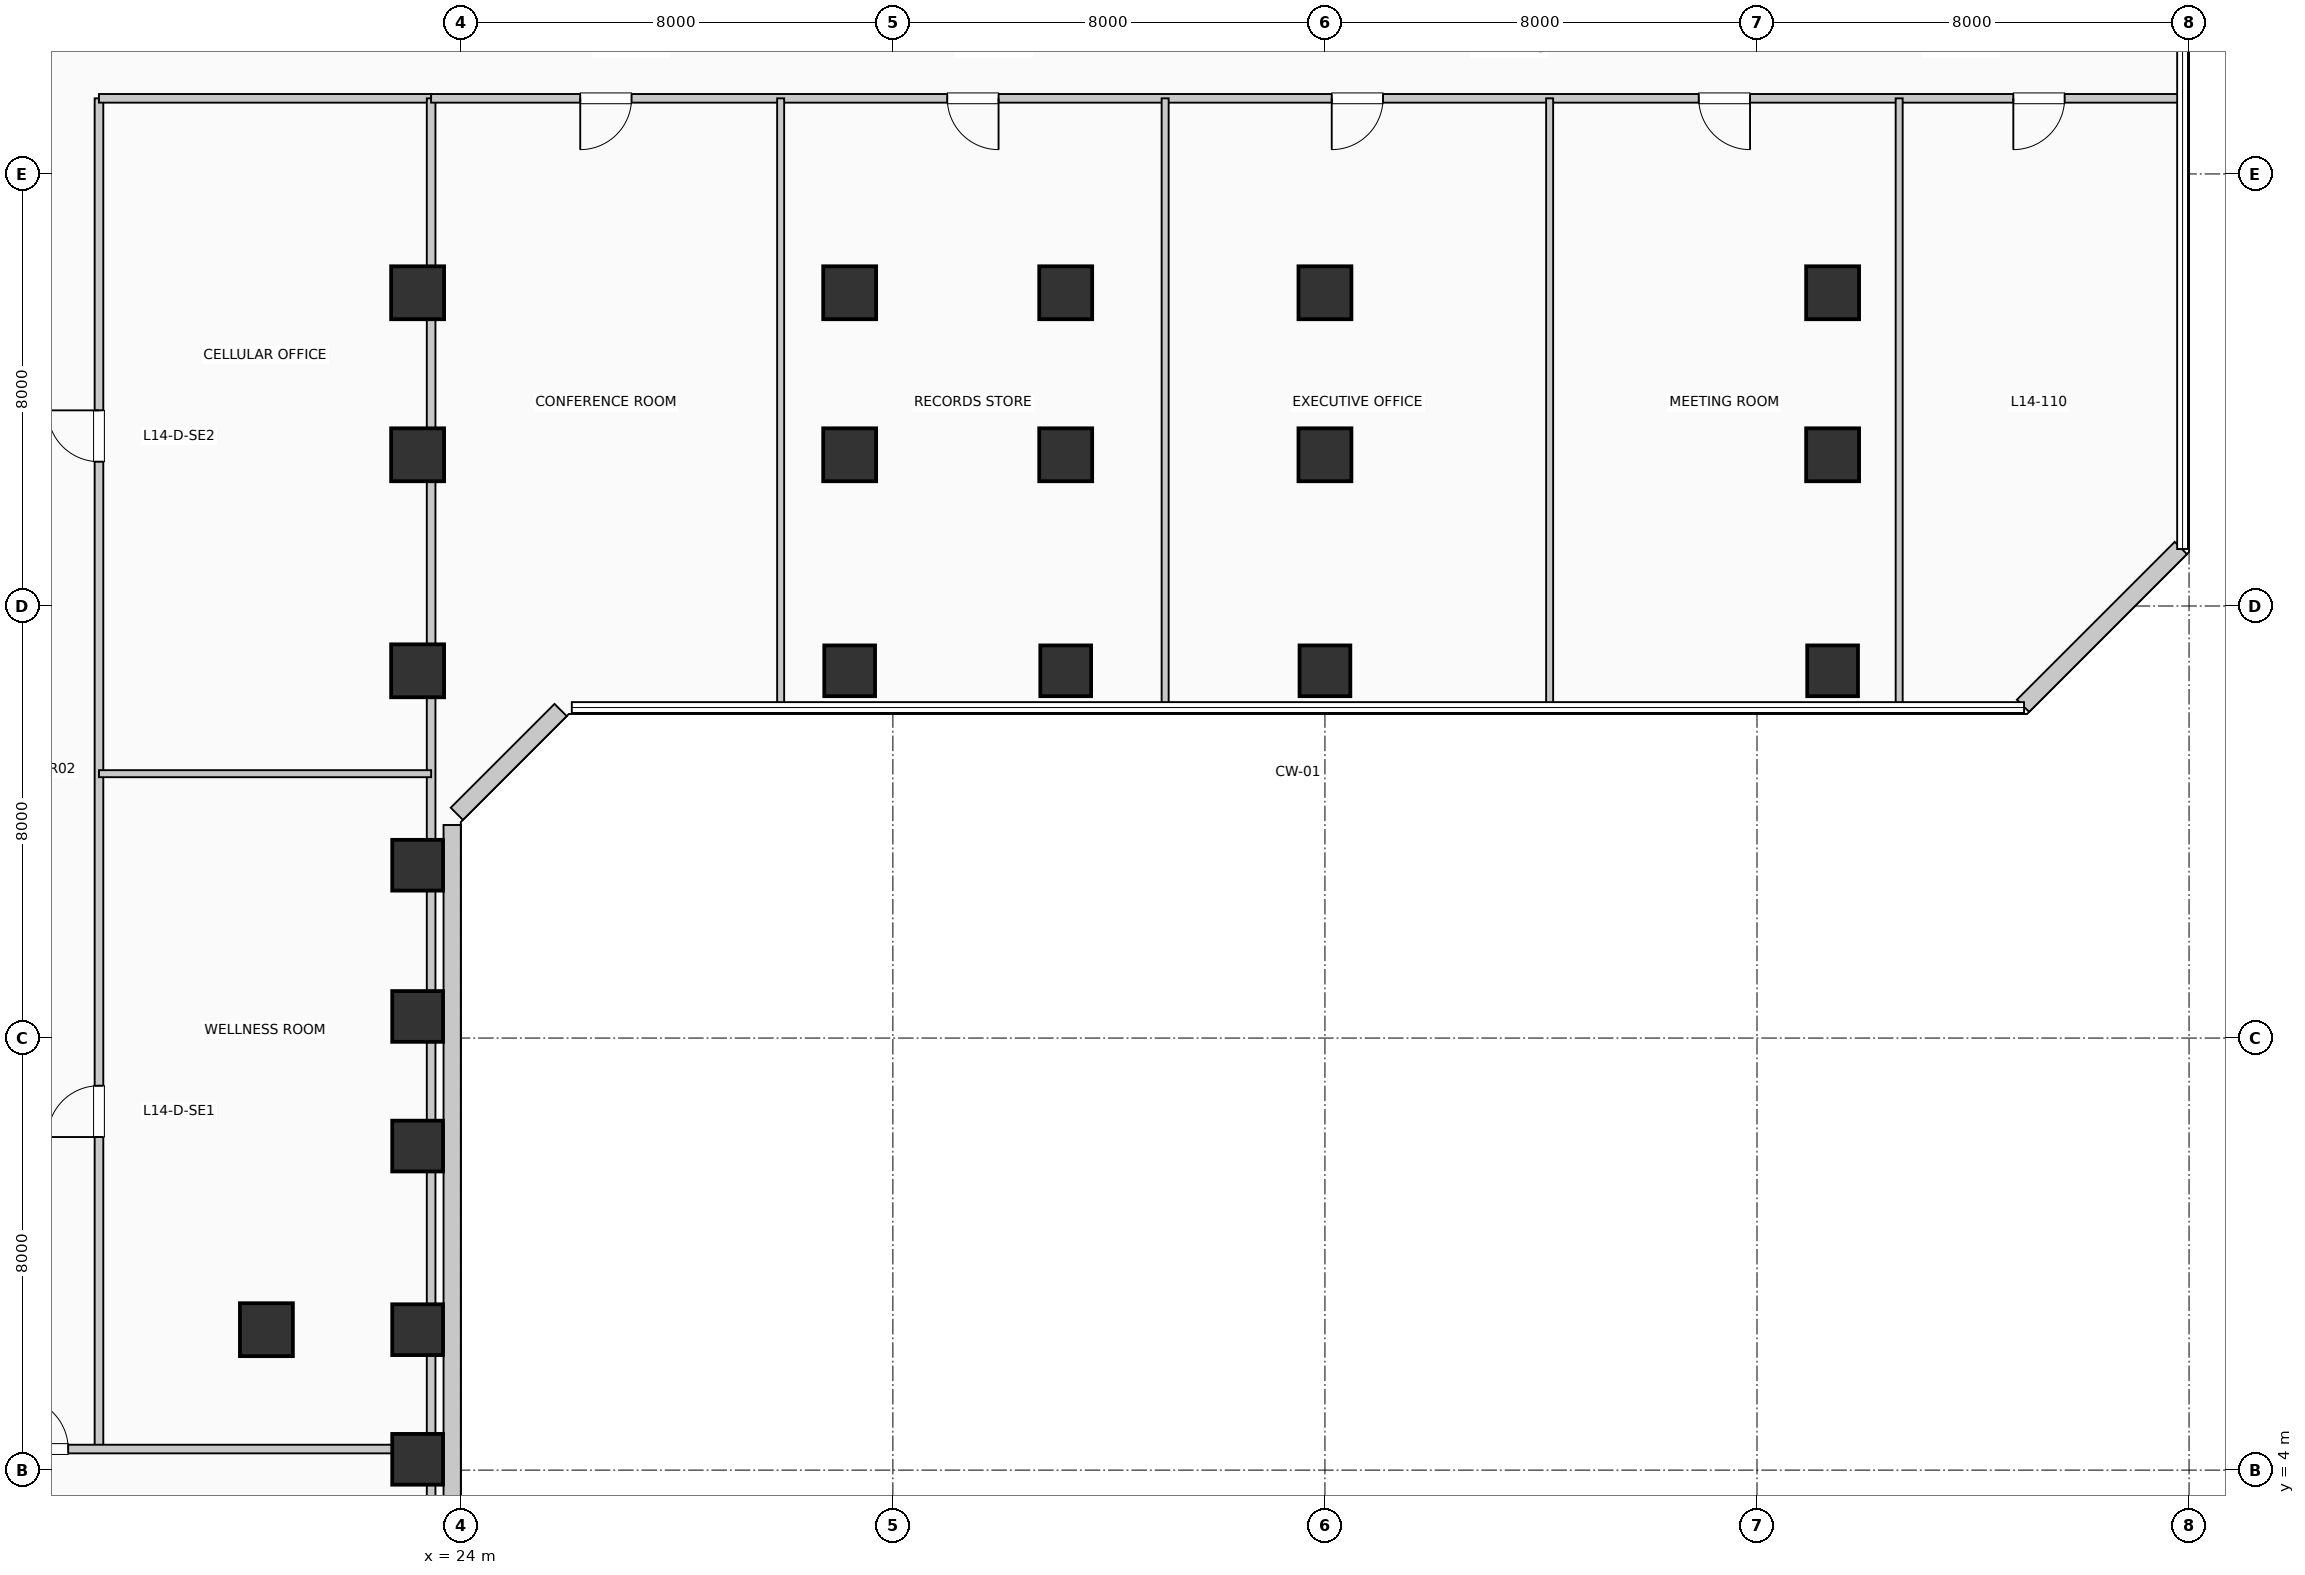
"""IFC4 building model, lengths in metres.
Left out: names, types, materials, properties, quantities, classifications, styles, units other than length and angle.
Written with IfcOpenShell. Run it as: python <this file> out.ifc"""

import sys

from ifc_helpers import new_model, si_unit, direction, frame, frame_2d, origin, origin_2d, place, context, subcontext, project, spatial, rectangle, extrude, element, fill, save


model = new_model("IFC4")
c1 = context("Model", 3, precision=1e-05, world=origin(), true_north=direction((0.0, 1.0)))
c2 = subcontext(c1, "Body", "Model", "MODEL_VIEW")
j1 = project(units=[si_unit("LENGTHUNIT", "METRE"), si_unit("PLANEANGLEUNIT", "RADIAN")], contexts=[c1])
p1 = place(None, origin())
s1 = spatial("IfcSite", under=j1, at=p1, CompositionType="ELEMENT")
p2 = place(p1, origin())
s2 = spatial("IfcBuilding", under=s1, at=p2, CompositionType="ELEMENT")
p3 = place(p2, frame((0.0, 0.0, 62.04)))
s3 = spatial("IfcBuildingStorey", under=s2, at=p3, CompositionType="ELEMENT", Elevation=62.04)
p4 = place(p3, frame((20.4, 6.6, 0.0), z_axis=(0.0, 0.0, 1.0), x_axis=(1.0, 0.0, 0.0)))
e1 = element("IfcColumn", 1, at=p4, inside=s3, PredefinedType="COLUMN", context=c2, shape_type="SweptSolid", body=[
    extrude(rectangle(XDim=0.98, YDim=0.98, at=origin_2d()), origin(), (0.0, 0.0, 1.0), 3.96),
])
for number, where, z_axis, x_axis in (
    (2, (23.2, 4.2, 0.0), (0.0, 0.0, 1.0), (1.0, 0.0, 0.0)),
    (3, (23.2, 6.6, 0.0), (0.0, 0.0, 1.0), (1.0, 0.0, 0.0)),
    (4, (23.2, 10.0, 0.0), (0.0, 0.0, 1.0), (1.0, 0.0, 0.0)),
    (5, (23.2, 12.4, 0.0), (0.0, 0.0, 1.0), (1.0, 0.0, 0.0)),
    (6, (23.2, 15.2, 0.0), (0.0, 0.0, 1.0), (1.0, 0.0, 0.0)),
):
    element("IfcColumn", number, at=place(p3, frame(where, z_axis=z_axis, x_axis=x_axis)), inside=s3, PredefinedType="COLUMN", context=c2, shape_type="SweptSolid", body=[
        extrude(rectangle(XDim=0.94, YDim=0.94, at=origin_2d()), origin(), (0.0, 0.0, 1.0), 3.96),
    ])
for number, where, z_axis, x_axis in (
    (7, (23.2, 18.8, 0.0), (0.0, 0.0, 1.0), (1.0, 0.0, 0.0)),
    (8, (23.2, 22.8, 0.0), (0.0, 0.0, 1.0), (1.0, 0.0, 0.0)),
    (9, (23.2, 25.8, 0.0), (0.0, 0.0, 1.0), (1.0, 0.0, 0.0)),
):
    element("IfcColumn", number, at=place(p3, frame(where, z_axis=z_axis, x_axis=x_axis)), inside=s3, PredefinedType="COLUMN", context=c2, shape_type="SweptSolid", body=[
        extrude(rectangle(XDim=0.98, YDim=0.98, at=origin_2d()), origin(), (0.0, 0.0, 1.0), 3.96),
    ])
p5 = place(p3, frame((31.2, 18.8, 0.0), z_axis=(0.0, 0.0, 1.0), x_axis=(1.0, 0.0, 0.0)))
e10 = element("IfcColumn", 10, at=p5, inside=s3, PredefinedType="COLUMN", context=c2, shape_type="SweptSolid", body=[
    extrude(rectangle(XDim=0.94, YDim=0.94, at=origin_2d()), origin(), (0.0, 0.0, 1.0), 3.96),
])
for number, where, z_axis, x_axis in (
    (11, (31.2, 22.8, 0.0), (0.0, 0.0, 1.0), (1.0, 0.0, 0.0)),
    (12, (31.2, 25.8, 0.0), (0.0, 0.0, 1.0), (1.0, 0.0, 0.0)),
):
    element("IfcColumn", number, at=place(p3, frame(where, z_axis=z_axis, x_axis=x_axis)), inside=s3, PredefinedType="COLUMN", context=c2, shape_type="SweptSolid", body=[
        extrude(rectangle(XDim=0.98, YDim=0.98, at=origin_2d()), origin(), (0.0, 0.0, 1.0), 3.96),
    ])
p6 = place(p3, frame((35.2, 18.8, 0.0), z_axis=(0.0, 0.0, 1.0), x_axis=(1.0, 0.0, 0.0)))
e13 = element("IfcColumn", 13, at=p6, inside=s3, PredefinedType="COLUMN", context=c2, shape_type="SweptSolid", body=[
    extrude(rectangle(XDim=0.94, YDim=0.94, at=origin_2d()), origin(), (0.0, 0.0, 1.0), 3.96),
])
for number, where, z_axis, x_axis in (
    (14, (35.2, 22.8, 0.0), (0.0, 0.0, 1.0), (1.0, 0.0, 0.0)),
    (15, (35.2, 25.8, 0.0), (0.0, 0.0, 1.0), (1.0, 0.0, 0.0)),
):
    element("IfcColumn", number, at=place(p3, frame(where, z_axis=z_axis, x_axis=x_axis)), inside=s3, PredefinedType="COLUMN", context=c2, shape_type="SweptSolid", body=[
        extrude(rectangle(XDim=0.98, YDim=0.98, at=origin_2d()), origin(), (0.0, 0.0, 1.0), 3.96),
    ])
p7 = place(p3, frame((40.0, 18.8, 0.0), z_axis=(0.0, 0.0, 1.0), x_axis=(1.0, 0.0, 0.0)))
e16 = element("IfcColumn", 16, at=p7, inside=s3, PredefinedType="COLUMN", context=c2, shape_type="SweptSolid", body=[
    extrude(rectangle(XDim=0.94, YDim=0.94, at=origin_2d()), origin(), (0.0, 0.0, 1.0), 3.96),
])
for number, where, z_axis, x_axis in (
    (17, (40.0, 22.8, 0.0), (0.0, 0.0, 1.0), (1.0, 0.0, 0.0)),
    (18, (40.0, 25.8, 0.0), (0.0, 0.0, 1.0), (1.0, 0.0, 0.0)),
):
    element("IfcColumn", number, at=place(p3, frame(where, z_axis=z_axis, x_axis=x_axis)), inside=s3, PredefinedType="COLUMN", context=c2, shape_type="SweptSolid", body=[
        extrude(rectangle(XDim=0.98, YDim=0.98, at=origin_2d()), origin(), (0.0, 0.0, 1.0), 3.96),
    ])
p8 = place(p3, frame((49.4, 18.8, 0.0), z_axis=(0.0, 0.0, 1.0), x_axis=(1.0, 0.0, 0.0)))
e19 = element("IfcColumn", 19, at=p8, inside=s3, PredefinedType="COLUMN", context=c2, shape_type="SweptSolid", body=[
    extrude(rectangle(XDim=0.94, YDim=0.94, at=origin_2d()), origin(), (0.0, 0.0, 1.0), 3.96),
])
for number, where, z_axis, x_axis in (
    (20, (49.4, 22.8, 0.0), (0.0, 0.0, 1.0), (1.0, 0.0, 0.0)),
    (21, (49.4, 25.8, 0.0), (0.0, 0.0, 1.0), (1.0, 0.0, 0.0)),
):
    element("IfcColumn", number, at=place(p3, frame(where, z_axis=z_axis, x_axis=x_axis)), inside=s3, PredefinedType="COLUMN", context=c2, shape_type="SweptSolid", body=[
        extrude(rectangle(XDim=0.98, YDim=0.98, at=origin_2d()), origin(), (0.0, 0.0, 1.0), 3.96),
    ])
p9 = place(p3, frame((23.84, 3.055, 0.0), z_axis=(0.0, 0.0, 1.0), x_axis=(0.0, 1.0, 0.0)))
e22 = element("IfcWall", 22, at=p9, inside=s3, PredefinedType="SOLIDWALL", context=c2, shape_type="SweptSolid", body=[
    extrude(rectangle(XDim=12.89, YDim=0.32, at=frame_2d((6.445, 0.0))), origin(), (0.0, 0.0, 1.0), 3.71),
])
p10 = place(p3, frame((23.926, 16.152, 0.0), z_axis=(0.0, 0.0, 1.0), x_axis=(0.707106781187, 0.707106781187, 0.0)))
e23 = element("IfcWall", 23, at=p10, inside=s3, PredefinedType="SOLIDWALL", context=c2, shape_type="SweptSolid", body=[
    extrude(rectangle(XDim=2.718, YDim=0.32, at=frame_2d((1.359, 0.0))), origin(), (0.0, 0.0, 1.0), 3.71),
])
p11 = place(p3, frame((52.926, 18.152, 0.0), z_axis=(0.0, 0.0, 1.0), x_axis=(0.707106781187, 0.707106781187, 0.0)))
e24 = element("IfcWall", 24, at=p11, inside=s3, PredefinedType="SOLIDWALL", context=c2, shape_type="SweptSolid", body=[
    extrude(rectangle(XDim=4.133, YDim=0.32, at=frame_2d((2.066, 0.0))), origin(), (0.0, 0.0, 1.0), 3.71),
])
p12 = place(p3, frame((17.3, 4.39, 0.0), z_axis=(0.0, 0.0, 1.0), x_axis=(0.0, 1.0, 0.0)))
e25 = element("IfcWall", 25, at=p12, inside=s3, PredefinedType="PARTITIONING", context=c2, shape_type="SweptSolid", body=[
    extrude(rectangle(XDim=25.01, YDim=0.16, at=frame_2d((12.505, 0.0))), origin(), (0.0, 0.0, 1.0), 3.71),
])
p13 = place(p12, frame((5.778, 0.0, 0.0)))
e26 = element("IfcOpeningElement", 26, at=p13, cuts=e25, PredefinedType="OPENING", context=c2, shape_type="SweptSolid", body=[
    extrude(rectangle(XDim=0.95, YDim=2.15, at=frame_2d((0.475, 1.075))), frame((0.0, 0.09, 0.0), z_axis=(0.0, -1.0, 0.0), x_axis=(1.0, 0.0, 0.0)), (0.0, 0.0, 1.0), 0.18),
])
p14 = place(p12, frame((18.282, 0.0, 0.0)))
e27 = element("IfcOpeningElement", 27, at=p14, cuts=e25, PredefinedType="OPENING", context=c2, shape_type="SweptSolid", body=[
    extrude(rectangle(XDim=0.95, YDim=2.15, at=frame_2d((0.475, 1.075))), frame((0.0, 0.09, 0.0), z_axis=(0.0, -1.0, 0.0), x_axis=(1.0, 0.0, 0.0)), (0.0, 0.0, 1.0), 0.18),
])
p15 = place(p3, frame((0.19, 4.39, 0.0), z_axis=(0.0, 0.0, 1.0), x_axis=(1.0, 0.0, 0.0)))
e28 = element("IfcWall", 28, at=p15, inside=s3, PredefinedType="PARTITIONING", context=c2, shape_type="SweptSolid", body=[
    extrude(rectangle(XDim=23.26, YDim=0.16, at=frame_2d((11.63, 0.0))), origin(), (0.0, 0.0, 1.0), 2.995),
])
p16 = place(p15, frame((15.59, 0.0, 0.0)))
e29 = element("IfcOpeningElement", 29, at=p16, cuts=e28, PredefinedType="OPENING", context=c2, shape_type="SweptSolid", body=[
    extrude(rectangle(XDim=0.95, YDim=2.15, at=frame_2d((0.475, 1.075))), frame((0.0, 0.09, 0.0), z_axis=(0.0, -1.0, 0.0), x_axis=(1.0, 0.0, 0.0)), (0.0, 0.0, 1.0), 0.18),
])
p17 = place(p3, frame((17.3, 29.4, 0.0), z_axis=(0.0, 0.0, 1.0), x_axis=(1.0, 0.0, 0.0)))
e30 = element("IfcWall", 30, at=p17, inside=s3, PredefinedType="PARTITIONING", context=c2, shape_type="SweptSolid", body=[
    extrude(rectangle(XDim=6.15, YDim=0.16, at=frame_2d((3.075, 0.0))), origin(), (0.0, 0.0, 1.0), 3.71),
])
p18 = place(p3, frame((23.45, 0.19, 0.0), z_axis=(0.0, 0.0, 1.0), x_axis=(0.0, 1.0, 0.0)))
e31 = element("IfcWall", 31, at=p18, inside=s3, PredefinedType="PARTITIONING", context=c2, shape_type="SweptSolid", body=[
    extrude(rectangle(XDim=29.21, YDim=0.16, at=frame_2d((14.605, 0.0))), origin(), (0.0, 0.0, 1.0), 2.995),
])
p19 = place(p3, frame((17.3, 16.895, 0.0), z_axis=(0.0, 0.0, 1.0), x_axis=(1.0, 0.0, 0.0)))
e32 = element("IfcWall", 32, at=p19, inside=s3, PredefinedType="PARTITIONING", context=c2, shape_type="SweptSolid", body=[
    extrude(rectangle(XDim=6.15, YDim=0.13, at=frame_2d((3.075, 0.0))), origin(), (0.0, 0.0, 1.0), 3.71),
])
p20 = place(p3, frame((23.45, 29.4, 0.0), z_axis=(0.0, 0.0, 1.0), x_axis=(1.0, 0.0, 0.0)))
e33 = element("IfcWall", 33, at=p20, inside=s3, PredefinedType="PARTITIONING", context=c2, shape_type="SweptSolid", body=[
    extrude(rectangle(XDim=32.36, YDim=0.16, at=frame_2d((16.18, 0.0))), origin(), (0.0, 0.0, 1.0), 3.365),
])
p21 = place(p20, frame((3.711, 0.0, 0.0), z_axis=(0.0, 0.0, 1.0), x_axis=(-1.0, 0.0, 0.0)))
e34 = element("IfcOpeningElement", 34, at=p21, cuts=e33, PredefinedType="OPENING", context=c2, shape_type="SweptSolid", body=[
    extrude(rectangle(XDim=0.95, YDim=2.15, at=frame_2d((0.475, 1.075))), frame((0.0, 0.09, 0.0), z_axis=(0.0, -1.0, 0.0), x_axis=(1.0, 0.0, 0.0)), (0.0, 0.0, 1.0), 0.18),
])
p22 = place(p20, frame((10.507, 0.0, 0.0), z_axis=(0.0, 0.0, 1.0), x_axis=(-1.0, 0.0, 0.0)))
e35 = element("IfcOpeningElement", 35, at=p22, cuts=e33, PredefinedType="OPENING", context=c2, shape_type="SweptSolid", body=[
    extrude(rectangle(XDim=0.95, YDim=2.15, at=frame_2d((0.475, 1.075))), frame((0.0, 0.09, 0.0), z_axis=(0.0, -1.0, 0.0), x_axis=(1.0, 0.0, 0.0)), (0.0, 0.0, 1.0), 0.18),
])
p23 = place(p20, frame((17.626, 0.0, 0.0), z_axis=(0.0, 0.0, 1.0), x_axis=(-1.0, 0.0, 0.0)))
e36 = element("IfcOpeningElement", 36, at=p23, cuts=e33, PredefinedType="OPENING", context=c2, shape_type="SweptSolid", body=[
    extrude(rectangle(XDim=0.95, YDim=2.15, at=frame_2d((0.475, 1.075))), frame((0.0, 0.09, 0.0), z_axis=(0.0, -1.0, 0.0), x_axis=(1.0, 0.0, 0.0)), (0.0, 0.0, 1.0), 0.18),
])
p24 = place(p20, frame((24.421, 0.0, 0.0), z_axis=(0.0, 0.0, 1.0), x_axis=(-1.0, 0.0, 0.0)))
e37 = element("IfcOpeningElement", 37, at=p24, cuts=e33, PredefinedType="OPENING", context=c2, shape_type="SweptSolid", body=[
    extrude(rectangle(XDim=0.95, YDim=2.15, at=frame_2d((0.475, 1.075))), frame((0.0, 0.09, 0.0), z_axis=(0.0, -1.0, 0.0), x_axis=(1.0, 0.0, 0.0)), (0.0, 0.0, 1.0), 0.18),
])
p25 = place(p20, frame((30.246, 0.0, 0.0), z_axis=(0.0, 0.0, 1.0), x_axis=(-1.0, 0.0, 0.0)))
e38 = element("IfcOpeningElement", 38, at=p25, cuts=e33, PredefinedType="OPENING", context=c2, shape_type="SweptSolid", body=[
    extrude(rectangle(XDim=0.95, YDim=2.15, at=frame_2d((0.475, 1.075))), frame((0.0, 0.09, 0.0), z_axis=(0.0, -1.0, 0.0), x_axis=(1.0, 0.0, 0.0)), (0.0, 0.0, 1.0), 0.18),
])
for number, where, z_axis, x_axis in (
    (39, (29.922, 18.19, 0.0), (0.0, 0.0, 1.0), (0.0, 1.0, 0.0)),
    (40, (37.041, 18.19, 0.0), (0.0, 0.0, 1.0), (0.0, 1.0, 0.0)),
    (41, (44.16, 18.19, 0.0), (0.0, 0.0, 1.0), (0.0, 1.0, 0.0)),
    (42, (50.632, 18.19, 0.0), (0.0, 0.0, 1.0), (0.0, 1.0, 0.0)),
):
    element("IfcWall", number, at=place(p3, frame(where, z_axis=z_axis, x_axis=x_axis)), inside=s3, PredefinedType="PARTITIONING", context=c2, shape_type="SweptSolid", body=[
        extrude(rectangle(XDim=11.21, YDim=0.13, at=frame_2d((5.605, 0.0))), origin(), (0.0, 0.0, 1.0), 3.71),
    ])
p26 = place(p16, origin())
e43 = element("IfcDoor", 43, at=p26, inside=s3, OperationType="SINGLE_SWING_LEFT", PredefinedType="DOOR", context=c2, shape_type="SweptSolid", body=[
    extrude(rectangle(XDim=0.95, YDim=2.15, at=frame_2d((0.475, 1.075))), frame((0.0, 0.025, 0.0), z_axis=(0.0, -1.0, 0.0), x_axis=(1.0, 0.0, 0.0)), (0.0, 0.0, 1.0), 0.05),
])
fill(e29, e43)
p27 = place(p13, origin())
e44 = element("IfcDoor", 44, at=p27, inside=s3, OperationType="SINGLE_SWING_LEFT", PredefinedType="DOOR", context=c2, shape_type="SweptSolid", body=[
    extrude(rectangle(XDim=0.95, YDim=2.15, at=frame_2d((0.475, 1.075))), frame((0.0, 0.025, 0.0), z_axis=(0.0, -1.0, 0.0), x_axis=(1.0, 0.0, 0.0)), (0.0, 0.0, 1.0), 0.05),
])
fill(e26, e44)
p28 = place(p14, origin())
e45 = element("IfcDoor", 45, at=p28, inside=s3, OperationType="SINGLE_SWING_RIGHT", PredefinedType="DOOR", context=c2, shape_type="SweptSolid", body=[
    extrude(rectangle(XDim=0.95, YDim=2.15, at=frame_2d((0.475, 1.075))), frame((0.0, 0.025, 0.0), z_axis=(0.0, -1.0, 0.0), x_axis=(1.0, 0.0, 0.0)), (0.0, 0.0, 1.0), 0.05),
])
fill(e27, e45)
p29 = place(p21, origin())
e46 = element("IfcDoor", 46, at=p29, inside=s3, OperationType="SINGLE_SWING_LEFT", PredefinedType="DOOR", context=c2, shape_type="SweptSolid", body=[
    extrude(rectangle(XDim=0.95, YDim=2.15, at=frame_2d((0.475, 1.075))), frame((0.0, 0.025, 0.0), z_axis=(0.0, -1.0, 0.0), x_axis=(1.0, 0.0, 0.0)), (0.0, 0.0, 1.0), 0.05),
])
fill(e34, e46)
p30 = place(p22, origin())
e47 = element("IfcDoor", 47, at=p30, inside=s3, OperationType="SINGLE_SWING_RIGHT", PredefinedType="DOOR", context=c2, shape_type="SweptSolid", body=[
    extrude(rectangle(XDim=0.95, YDim=2.15, at=frame_2d((0.475, 1.075))), frame((0.0, 0.025, 0.0), z_axis=(0.0, -1.0, 0.0), x_axis=(1.0, 0.0, 0.0)), (0.0, 0.0, 1.0), 0.05),
])
fill(e35, e47)
p31 = place(p23, origin())
e48 = element("IfcDoor", 48, at=p31, inside=s3, OperationType="SINGLE_SWING_LEFT", PredefinedType="DOOR", context=c2, shape_type="SweptSolid", body=[
    extrude(rectangle(XDim=0.95, YDim=2.15, at=frame_2d((0.475, 1.075))), frame((0.0, 0.025, 0.0), z_axis=(0.0, -1.0, 0.0), x_axis=(1.0, 0.0, 0.0)), (0.0, 0.0, 1.0), 0.05),
])
fill(e36, e48)
p32 = place(p24, origin())
e49 = element("IfcDoor", 49, at=p32, inside=s3, OperationType="SINGLE_SWING_RIGHT", PredefinedType="DOOR", context=c2, shape_type="SweptSolid", body=[
    extrude(rectangle(XDim=0.95, YDim=2.15, at=frame_2d((0.475, 1.075))), frame((0.0, 0.025, 0.0), z_axis=(0.0, -1.0, 0.0), x_axis=(1.0, 0.0, 0.0)), (0.0, 0.0, 1.0), 0.05),
])
fill(e37, e49)
p33 = place(p25, origin())
e50 = element("IfcDoor", 50, at=p33, inside=s3, OperationType="SINGLE_SWING_LEFT", PredefinedType="DOOR", context=c2, shape_type="SweptSolid", body=[
    extrude(rectangle(XDim=0.95, YDim=2.15, at=frame_2d((0.475, 1.075))), frame((0.0, 0.025, 0.0), z_axis=(0.0, -1.0, 0.0), x_axis=(1.0, 0.0, 0.0)), (0.0, 0.0, 1.0), 0.05),
])
fill(e38, e50)
save(model, sys.argv[1])
